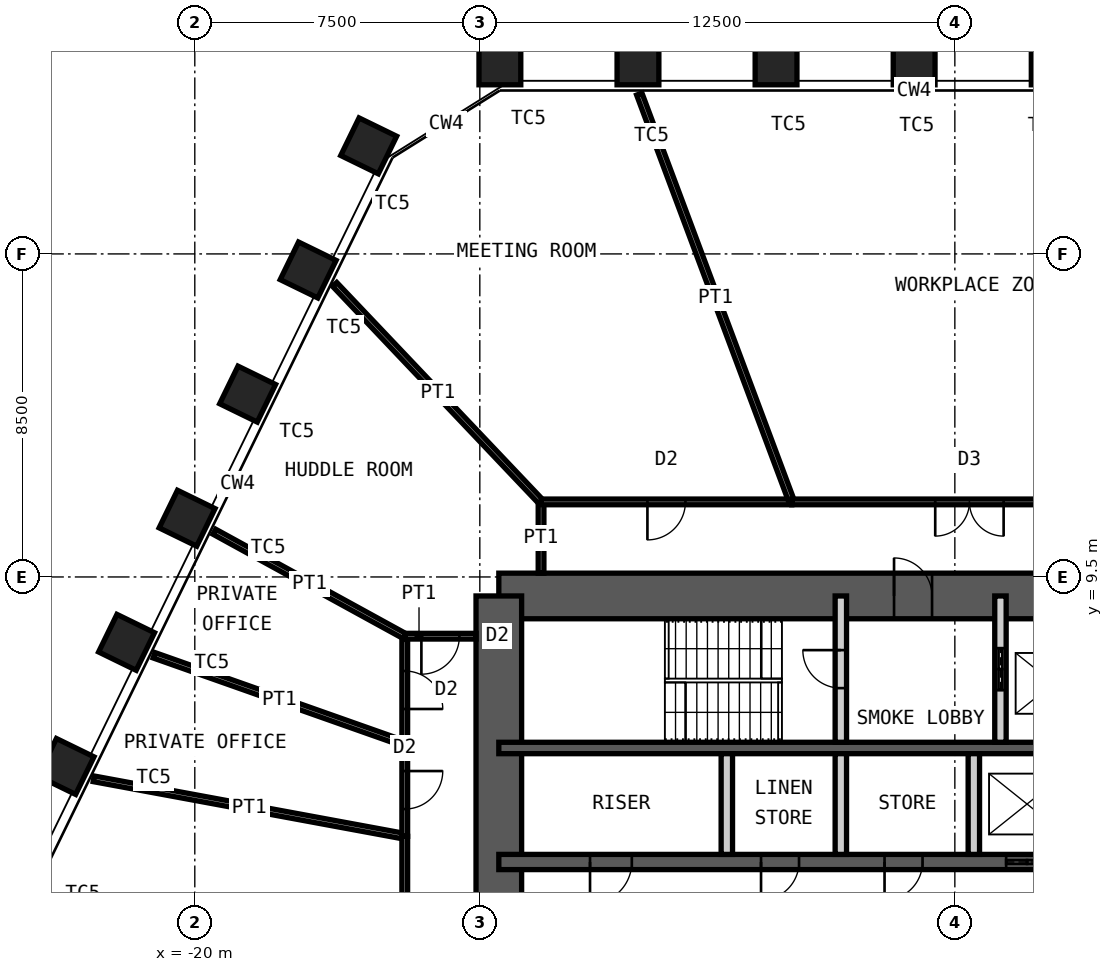
"""IFC4 building model, lengths in metres.
Left out: names, types, materials, properties, quantities, classifications, styles, units other than length and angle.
Written with IfcOpenShell. Run it as: python <this file> out.ifc"""

import sys

from ifc_helpers import new_model, si_unit, direction, frame, frame_2d, origin, origin_2d, place, context, subcontext, project, spatial, rectangle, hollow_rectangle, extrude, element, fill, save


model = new_model("IFC4")
c1 = context("Model", 3, precision=1e-05, world=origin(), true_north=direction((0.0, 1.0)))
c2 = subcontext(c1, "Body", "Model", "MODEL_VIEW")
j1 = project(units=[si_unit("LENGTHUNIT", "METRE"), si_unit("PLANEANGLEUNIT", "RADIAN")], contexts=[c1])
p1 = place(None, origin())
s1 = spatial("IfcSite", under=j1, at=p1, CompositionType="ELEMENT")
p2 = place(p1, origin())
s2 = spatial("IfcBuilding", under=s1, at=p2, CompositionType="ELEMENT")
p3 = place(p2, frame((0.0, 0.0, 188.8)))
s3 = spatial("IfcBuildingStorey", under=s2, at=p3, CompositionType="ELEMENT", Elevation=188.8)
for number, where, z_axis, x_axis in (
    (1, (-11.972, 23.0, 0.0), (0.0, 0.0, 1.0), (-1.0, 0.0, 0.0)),
    (2, (-8.338, 23.0, 0.0), (0.0, 0.0, 1.0), (-1.0, 0.0, 0.0)),
    (3, (-4.705, 23.0, 0.0), (0.0, 0.0, 1.0), (-1.0, 0.0, 0.0)),
    (4, (-1.071, 23.0, 0.0), (0.0, 0.0, 1.0), (-1.0, 0.0, 0.0)),
    (5, (2.562, 23.0, 0.0), (0.0, 0.0, 1.0), (-1.0, 0.0, 0.0)),
    (6, (-23.388, 4.514, 0.0), (0.0, 0.0, 1.0), (-0.438, -0.899, 0.0)),
    (7, (-21.795, 7.78, 0.0), (0.0, 0.0, 1.0), (-0.438, -0.899, 0.0)),
    (8, (-20.203, 11.045, 0.0), (0.0, 0.0, 1.0), (-0.438, -0.899, 0.0)),
    (9, (-18.61, 14.311, 0.0), (0.0, 0.0, 1.0), (-0.438, -0.899, 0.0)),
    (10, (-17.017, 17.577, 0.0), (0.0, 0.0, 1.0), (-0.438, -0.899, 0.0)),
    (11, (-15.424, 20.843, 0.0), (0.0, 0.0, 1.0), (-0.438, -0.899, 0.0)),
):
    element("IfcColumn", number, at=place(p3, frame(where, z_axis=z_axis, x_axis=x_axis)), inside=s3, PredefinedType="COLUMN", context=c2, shape_type="SweptSolid", body=[
        extrude(hollow_rectangle(XDim=1.1, YDim=1.1, WallThickness=0.07, at=origin_2d()), origin(), (0.0, 0.0, 1.0), 4.2),
    ])
p4 = place(p3, frame((-12.0, 9.0, 0.0), z_axis=(0.0, 0.0, 1.0), x_axis=(1.0, 0.0, 0.0)))
e12 = element("IfcWall", 12, at=p4, inside=s3, PredefinedType="SHEAR", context=c2, shape_type="SweptSolid", body=[
    extrude(rectangle(XDim=24.0, YDim=1.2, at=frame_2d((12.0, 0.0))), origin(), (0.0, 0.0, 1.0), 4.2),
])
p5 = place(p4, frame((10.4, 0.0, 0.0)))
e13 = element("IfcOpeningElement", 13, at=p5, cuts=e12, PredefinedType="OPENING", context=c2, shape_type="SweptSolid", body=[
    extrude(rectangle(XDim=1.0, YDim=2.1, at=frame_2d((0.5, 1.05))), frame((0.0, 0.61, 0.0), z_axis=(0.0, -1.0, 0.0), x_axis=(1.0, 0.0, 0.0)), (0.0, 0.0, 1.0), 1.22),
])
p6 = place(p4, frame((17.6, 0.0, 0.0)))
e14 = element("IfcOpeningElement", 14, at=p6, cuts=e12, PredefinedType="OPENING", context=c2, shape_type="SweptSolid", body=[
    extrude(rectangle(XDim=0.9, YDim=2.1, at=frame_2d((0.45, 1.05))), frame((0.0, 0.61, 0.0), z_axis=(0.0, -1.0, 0.0), x_axis=(1.0, 0.0, 0.0)), (0.0, 0.0, 1.0), 1.22),
])
p7 = place(p4, frame((21.9, 0.0, 0.0)))
e15 = element("IfcOpeningElement", 15, at=p7, cuts=e12, PredefinedType="OPENING", context=c2, shape_type="SweptSolid", body=[
    extrude(rectangle(XDim=0.9, YDim=2.1, at=frame_2d((0.45, 1.05))), frame((0.0, 0.61, 0.0), z_axis=(0.0, -1.0, 0.0), x_axis=(1.0, 0.0, 0.0)), (0.0, 0.0, 1.0), 1.22),
])
p8 = place(p3, frame((-12.0, -9.0, 0.0), z_axis=(0.0, 0.0, 1.0), x_axis=(0.0, 1.0, 0.0)))
e16 = element("IfcWall", 16, at=p8, inside=s3, PredefinedType="SHEAR", context=c2, shape_type="SweptSolid", body=[
    extrude(rectangle(XDim=18.0, YDim=1.2, at=frame_2d((9.0, 0.0))), origin(), (0.0, 0.0, 1.0), 4.2),
])
p9 = place(p8, frame((8.1, 0.0, 0.0)))
e17 = element("IfcOpeningElement", 17, at=p9, cuts=e16, PredefinedType="OPENING", context=c2, shape_type="SweptSolid", body=[
    extrude(rectangle(XDim=1.8, YDim=2.1, at=frame_2d((0.9, 1.05))), frame((0.0, 0.61, 0.0), z_axis=(0.0, -1.0, 0.0), x_axis=(1.0, 0.0, 0.0)), (0.0, 0.0, 1.0), 1.22),
])
p10 = place(p3, frame((-12.0, 5.0, 0.0), z_axis=(0.0, 0.0, 1.0), x_axis=(1.0, 0.0, 0.0)))
e18 = element("IfcWall", 18, at=p10, inside=s3, PredefinedType="SHEAR", context=c2, shape_type="SweptSolid", body=[
    extrude(rectangle(XDim=24.0, YDim=0.3, at=frame_2d((12.0, 0.0))), origin(), (0.0, 0.0, 1.0), 4.2),
])
p11 = place(p3, frame((-12.0, 2.0, 0.0), z_axis=(0.0, 0.0, 1.0), x_axis=(1.0, 0.0, 0.0)))
e19 = element("IfcWall", 19, at=p11, inside=s3, PredefinedType="SHEAR", context=c2, shape_type="SweptSolid", body=[
    extrude(rectangle(XDim=24.0, YDim=0.4, at=frame_2d((12.0, 0.0))), origin(), (0.0, 0.0, 1.0), 4.2),
])
p12 = place(p11, frame((2.4, 0.0, 0.0)))
e20 = element("IfcOpeningElement", 20, at=p12, cuts=e19, PredefinedType="OPENING", context=c2, shape_type="SweptSolid", body=[
    extrude(rectangle(XDim=1.1, YDim=2.1, at=frame_2d((0.55, 1.05))), frame((0.0, 0.21, 0.0), z_axis=(0.0, -1.0, 0.0), x_axis=(1.0, 0.0, 0.0)), (0.0, 0.0, 1.0), 0.42),
])
p13 = place(p11, frame((22.0, 0.0, 0.0)))
e21 = element("IfcOpeningElement", 21, at=p13, cuts=e19, PredefinedType="OPENING", context=c2, shape_type="SweptSolid", body=[
    extrude(rectangle(XDim=1.1, YDim=2.1, at=frame_2d((0.55, 1.05))), frame((0.0, 0.21, 0.0), z_axis=(0.0, -1.0, 0.0), x_axis=(1.0, 0.0, 0.0)), (0.0, 0.0, 1.0), 0.42),
])
p14 = place(p11, frame((10.15, 0.0, 0.0)))
e22 = element("IfcOpeningElement", 22, at=p14, cuts=e19, PredefinedType="OPENING", context=c2, shape_type="SweptSolid", body=[
    extrude(rectangle(XDim=1.0, YDim=2.1, at=frame_2d((0.5, 1.05))), frame((0.0, 0.21, 0.0), z_axis=(0.0, -1.0, 0.0), x_axis=(1.0, 0.0, 0.0)), (0.0, 0.0, 1.0), 0.42),
])
p15 = place(p11, frame((6.9, 0.0, 0.0)))
e23 = element("IfcOpeningElement", 23, at=p15, cuts=e19, PredefinedType="OPENING", context=c2, shape_type="SweptSolid", body=[
    extrude(rectangle(XDim=1.0, YDim=2.1, at=frame_2d((0.5, 1.05))), frame((0.0, 0.21, 0.0), z_axis=(0.0, -1.0, 0.0), x_axis=(1.0, 0.0, 0.0)), (0.0, 0.0, 1.0), 0.42),
])
p16 = place(p11, frame((13.35, 0.0, 0.0)))
e24 = element("IfcOpeningElement", 24, at=p16, cuts=e19, PredefinedType="OPENING", context=c2, shape_type="SweptSolid", body=[
    extrude(rectangle(XDim=1.1, YDim=2.4, at=frame_2d((0.55, 1.2))), frame((0.0, 0.21, 0.0), z_axis=(0.0, -1.0, 0.0), x_axis=(1.0, 0.0, 0.0)), (0.0, 0.0, 1.0), 0.42),
])
p17 = place(p11, frame((16.15, 0.0, 0.0)))
e25 = element("IfcOpeningElement", 25, at=p17, cuts=e19, PredefinedType="OPENING", context=c2, shape_type="SweptSolid", body=[
    extrude(rectangle(XDim=1.1, YDim=2.4, at=frame_2d((0.55, 1.2))), frame((0.0, 0.21, 0.0), z_axis=(0.0, -1.0, 0.0), x_axis=(1.0, 0.0, 0.0)), (0.0, 0.0, 1.0), 0.42),
])
p18 = place(p11, frame((18.95, 0.0, 0.0)))
e26 = element("IfcOpeningElement", 26, at=p18, cuts=e19, PredefinedType="OPENING", context=c2, shape_type="SweptSolid", body=[
    extrude(rectangle(XDim=1.1, YDim=2.4, at=frame_2d((0.55, 1.2))), frame((0.0, 0.21, 0.0), z_axis=(0.0, -1.0, 0.0), x_axis=(1.0, 0.0, 0.0)), (0.0, 0.0, 1.0), 0.42),
])
p19 = place(p3, frame((-3.0, 5.15, 0.0), z_axis=(0.0, 0.0, 1.0), x_axis=(0.0, 1.0, 0.0)))
e27 = element("IfcWall", 27, at=p19, inside=s3, PredefinedType="PARTITIONING", context=c2, shape_type="SweptSolid", body=[
    extrude(rectangle(XDim=3.85, YDim=0.3, at=frame_2d((1.925, 0.0))), origin(), (0.0, 0.0, 1.0), 3.98),
])
p20 = place(p19, frame((1.425, 0.0, 0.0)))
e28 = element("IfcOpeningElement", 28, at=p20, cuts=e27, PredefinedType="OPENING", context=c2, shape_type="SweptSolid", body=[
    extrude(rectangle(XDim=1.0, YDim=2.1, at=frame_2d((0.5, 1.05))), frame((0.0, 0.16, 0.0), z_axis=(0.0, -1.0, 0.0), x_axis=(1.0, 0.0, 0.0)), (0.0, 0.0, 1.0), 0.32),
])
p21 = place(p3, frame((1.2, 5.15, 0.0), z_axis=(0.0, 0.0, 1.0), x_axis=(0.0, 1.0, 0.0)))
e29 = element("IfcWall", 29, at=p21, inside=s3, PredefinedType="PARTITIONING", context=c2, shape_type="SweptSolid", body=[
    extrude(rectangle(XDim=3.85, YDim=0.3, at=frame_2d((1.925, 0.0))), origin(), (0.0, 0.0, 1.0), 3.98),
])
p22 = place(p21, frame((1.375, 0.0, 0.0)))
e30 = element("IfcOpeningElement", 30, at=p22, cuts=e29, PredefinedType="OPENING", context=c2, shape_type="SweptSolid", body=[
    extrude(rectangle(XDim=1.1, YDim=2.4, at=frame_2d((0.55, 1.2))), frame((0.0, 0.16, 0.0), z_axis=(0.0, -1.0, 0.0), x_axis=(1.0, 0.0, 0.0)), (0.0, 0.0, 1.0), 0.32),
])
for number, where, z_axis, x_axis in (
    (31, (-6.0, 2.2, 0.0), (0.0, 0.0, 1.0), (0.0, 1.0, 0.0)),
    (32, (-3.0, 2.2, 0.0), (0.0, 0.0, 1.0), (0.0, 1.0, 0.0)),
    (33, (0.5, 2.2, 0.0), (0.0, 0.0, 1.0), (0.0, 1.0, 0.0)),
):
    element("IfcWall", number, at=place(p3, frame(where, z_axis=z_axis, x_axis=x_axis)), inside=s3, PredefinedType="PARTITIONING", context=c2, shape_type="SweptSolid", body=[
        extrude(rectangle(XDim=2.65, YDim=0.3, at=frame_2d((1.325, 0.0))), origin(), (0.0, 0.0, 1.0), 3.98),
    ])
p23 = place(p3, frame((-22.661, 4.189, 0.0), z_axis=(0.0, 0.0, 1.0), x_axis=(0.983345347199, -0.181746879316, 0.0)))
e34 = element("IfcWall", 34, at=p23, inside=s3, PredefinedType="PARTITIONING", context=c2, shape_type="SweptSolid", body=[
    extrude(rectangle(XDim=8.324, YDim=0.15, at=frame_2d((4.162, 0.0))), origin(), (0.0, 0.0, 1.0), 3.43),
])
p24 = place(p3, frame((-14.475, 2.676, 0.0), z_axis=(0.0, 0.0, 1.0), x_axis=(0.0, 1.0, 0.0)))
e35 = element("IfcWall", 35, at=p24, inside=s3, PredefinedType="PARTITIONING", context=c2, shape_type="SweptSolid", body=[
    extrude(rectangle(XDim=2.435, YDim=0.15, at=frame_2d((1.217, 0.0))), origin(), (0.0, 0.0, 1.0), 4.03),
])
p25 = place(p24, frame((0.717, 0.0, 0.0)))
e36 = element("IfcOpeningElement", 36, at=p25, cuts=e35, PredefinedType="OPENING", context=c2, shape_type="SweptSolid", body=[
    extrude(rectangle(XDim=1.0, YDim=2.4, at=frame_2d((0.5, 1.2))), frame((0.0, 0.085, 0.0), z_axis=(0.0, -1.0, 0.0), x_axis=(1.0, 0.0, 0.0)), (0.0, 0.0, 1.0), 0.17),
])
p26 = place(p3, frame((-21.072, 7.439, 0.0), z_axis=(0.0, 0.0, 1.0), x_axis=(0.94295553867, -0.332918686907, 0.0)))
e37 = element("IfcWall", 37, at=p26, inside=s3, PredefinedType="PARTITIONING", context=c2, shape_type="SweptSolid", body=[
    extrude(rectangle(XDim=6.996, YDim=0.15, at=frame_2d((3.498, 0.0))), origin(), (0.0, 0.0, 1.0), 3.43),
])
p27 = place(p3, frame((-14.475, 5.11, 0.0), z_axis=(0.0, 0.0, 1.0), x_axis=(0.0, 1.0, 0.0)))
e38 = element("IfcWall", 38, at=p27, inside=s3, PredefinedType="PARTITIONING", context=c2, shape_type="SweptSolid", body=[
    extrude(rectangle(XDim=2.831, YDim=0.15, at=frame_2d((1.416, 0.0))), origin(), (0.0, 0.0, 1.0), 4.03),
])
p28 = place(p27, frame((0.916, 0.0, 0.0)))
e39 = element("IfcOpeningElement", 39, at=p28, cuts=e38, PredefinedType="OPENING", context=c2, shape_type="SweptSolid", body=[
    extrude(rectangle(XDim=1.0, YDim=2.4, at=frame_2d((0.5, 1.2))), frame((0.0, 0.085, 0.0), z_axis=(0.0, -1.0, 0.0), x_axis=(1.0, 0.0, 0.0)), (0.0, 0.0, 1.0), 0.17),
])
p29 = place(p3, frame((-19.486, 10.69, 0.0), z_axis=(0.0, 0.0, 1.0), x_axis=(0.876724089264, -0.480993629172, 0.0)))
e40 = element("IfcWall", 40, at=p29, inside=s3, PredefinedType="PARTITIONING", context=c2, shape_type="SweptSolid", body=[
    extrude(rectangle(XDim=5.715, YDim=0.15, at=frame_2d((2.858, 0.0))), origin(), (0.0, 0.0, 1.0), 3.43),
])
p30 = place(p3, frame((-14.475, 7.941, 0.0), z_axis=(0.0, 0.0, 1.0), x_axis=(1.0, 0.0, 0.0)))
e41 = element("IfcWall", 41, at=p30, inside=s3, PredefinedType="PARTITIONING", context=c2, shape_type="SweptSolid", body=[
    extrude(rectangle(XDim=1.875, YDim=0.15, at=frame_2d((0.938, 0.0))), origin(), (0.0, 0.0, 1.0), 4.03),
])
p31 = place(p30, frame((0.438, 0.0, 0.0)))
e42 = element("IfcOpeningElement", 42, at=p31, cuts=e41, PredefinedType="OPENING", context=c2, shape_type="SweptSolid", body=[
    extrude(rectangle(XDim=1.0, YDim=2.4, at=frame_2d((0.5, 1.2))), frame((0.0, 0.085, 0.0), z_axis=(0.0, -1.0, 0.0), x_axis=(1.0, 0.0, 0.0)), (0.0, 0.0, 1.0), 0.17),
])
p32 = place(p3, frame((-10.889, 9.6, 0.0), z_axis=(0.0, 0.0, 1.0), x_axis=(0.0, 1.0, 0.0)))
e43 = element("IfcWall", 43, at=p32, inside=s3, PredefinedType="PARTITIONING", context=c2, shape_type="SweptSolid", body=[
    extrude(rectangle(XDim=1.875, YDim=0.15, at=frame_2d((0.938, 0.0))), origin(), (0.0, 0.0, 1.0), 4.03),
])
p33 = place(p3, frame((-16.319, 17.198, 0.0), z_axis=(0.0, 0.0, 1.0), x_axis=(0.688326413955, -0.725401094466, 0.0)))
e44 = element("IfcWall", 44, at=p33, inside=s3, PredefinedType="PARTITIONING", context=c2, shape_type="SweptSolid", body=[
    extrude(rectangle(XDim=7.889, YDim=0.15, at=frame_2d((3.944, 0.0))), origin(), (0.0, 0.0, 1.0), 4.03),
])
p34 = place(p3, frame((-10.889, 11.475, 0.0), z_axis=(0.0, 0.0, 1.0), x_axis=(1.0, 0.0, 0.0)))
e45 = element("IfcWall", 45, at=p34, inside=s3, PredefinedType="PARTITIONING", context=c2, shape_type="SweptSolid", body=[
    extrude(rectangle(XDim=6.598, YDim=0.15, at=frame_2d((3.299, 0.0))), origin(), (0.0, 0.0, 1.0), 4.03),
])
p35 = place(p34, frame((2.799, 0.0, 0.0)))
e46 = element("IfcOpeningElement", 46, at=p35, cuts=e45, PredefinedType="OPENING", context=c2, shape_type="SweptSolid", body=[
    extrude(rectangle(XDim=1.0, YDim=2.4, at=frame_2d((0.5, 1.2))), frame((0.0, 0.085, 0.0), z_axis=(0.0, -1.0, 0.0), x_axis=(1.0, 0.0, 0.0)), (0.0, 0.0, 1.0), 0.17),
])
p36 = place(p3, frame((-8.303, 22.206, 0.0), z_axis=(0.0, 0.0, 1.0), x_axis=(0.350242883069, -0.936658914899, 0.0)))
e47 = element("IfcWall", 47, at=p36, inside=s3, PredefinedType="PARTITIONING", context=c2, shape_type="SweptSolid", body=[
    extrude(rectangle(XDim=11.457, YDim=0.15, at=frame_2d((5.729, 0.0))), origin(), (0.0, 0.0, 1.0), 3.43),
])
p37 = place(p3, frame((-4.291, 11.475, 0.0), z_axis=(0.0, 0.0, 1.0), x_axis=(1.0, 0.0, 0.0)))
e48 = element("IfcWall", 48, at=p37, inside=s3, PredefinedType="PARTITIONING", context=c2, shape_type="SweptSolid", body=[
    extrude(rectangle(XDim=9.349, YDim=0.15, at=frame_2d((4.674, 0.0))), origin(), (0.0, 0.0, 1.0), 4.03),
])
p38 = place(p37, frame((3.774, 0.0, 0.0)))
e49 = element("IfcOpeningElement", 49, at=p38, cuts=e48, PredefinedType="OPENING", context=c2, shape_type="SweptSolid", body=[
    extrude(rectangle(XDim=1.8, YDim=2.4, at=frame_2d((0.9, 1.2))), frame((0.0, 0.085, 0.0), z_axis=(0.0, -1.0, 0.0), x_axis=(1.0, 0.0, 0.0)), (0.0, 0.0, 1.0), 0.17),
])
p39 = place(p3, frame((-14.475, -9.311, 0.0), z_axis=(0.0, 0.0, 1.0), x_axis=(0.0, 1.0, 0.0)))
e50 = element("IfcWall", 50, at=p39, inside=s3, PredefinedType="PARTITIONING", context=c2, shape_type="SweptSolid", body=[
    extrude(rectangle(XDim=11.987, YDim=0.15, at=frame_2d((5.993, 0.0))), origin(), (0.0, 0.0, 1.0), 4.03),
])
p40 = place(p39, frame((5.093, 0.0, 0.0)))
e51 = element("IfcOpeningElement", 51, at=p40, cuts=e50, PredefinedType="OPENING", context=c2, shape_type="SweptSolid", body=[
    extrude(rectangle(XDim=1.8, YDim=2.4, at=frame_2d((0.9, 1.2))), frame((0.0, 0.085, 0.0), z_axis=(0.0, -1.0, 0.0), x_axis=(1.0, 0.0, 0.0)), (0.0, 0.0, 1.0), 0.17),
])
p41 = place(p5, origin())
e52 = element("IfcDoor", 52, at=p41, inside=s3, OperationType="SINGLE_SWING_RIGHT", PredefinedType="DOOR", context=c2, shape_type="SweptSolid", body=[
    extrude(rectangle(XDim=1.0, YDim=2.1, at=frame_2d((0.5, 1.05))), frame((0.0, 0.025, 0.0), z_axis=(0.0, -1.0, 0.0), x_axis=(1.0, 0.0, 0.0)), (0.0, 0.0, 1.0), 0.05),
])
fill(e13, e52)
p42 = place(p20, origin())
e53 = element("IfcDoor", 53, at=p42, inside=s3, OperationType="SINGLE_SWING_LEFT", PredefinedType="DOOR", context=c2, shape_type="SweptSolid", body=[
    extrude(rectangle(XDim=1.0, YDim=2.1, at=frame_2d((0.5, 1.05))), frame((0.0, 0.025, 0.0), z_axis=(0.0, -1.0, 0.0), x_axis=(1.0, 0.0, 0.0)), (0.0, 0.0, 1.0), 0.05),
])
fill(e28, e53)
p43 = place(p12, origin())
e54 = element("IfcDoor", 54, at=p43, inside=s3, OperationType="SINGLE_SWING_LEFT", PredefinedType="DOOR", context=c2, shape_type="SweptSolid", body=[
    extrude(rectangle(XDim=1.1, YDim=2.1, at=frame_2d((0.55, 1.05))), frame((0.0, 0.025, 0.0), z_axis=(0.0, -1.0, 0.0), x_axis=(1.0, 0.0, 0.0)), (0.0, 0.0, 1.0), 0.05),
])
fill(e20, e54)
p44 = place(p14, origin())
e55 = element("IfcDoor", 55, at=p44, inside=s3, OperationType="SINGLE_SWING_LEFT", PredefinedType="DOOR", context=c2, shape_type="SweptSolid", body=[
    extrude(rectangle(XDim=1.0, YDim=2.1, at=frame_2d((0.5, 1.05))), frame((0.0, 0.025, 0.0), z_axis=(0.0, -1.0, 0.0), x_axis=(1.0, 0.0, 0.0)), (0.0, 0.0, 1.0), 0.05),
])
fill(e22, e55)
p45 = place(p22, origin())
e56 = element("IfcDoor", 56, at=p45, inside=s3, OperationType="DOUBLE_DOOR_SLIDING", PredefinedType="DOOR", context=c2, shape_type="SweptSolid", body=[
    extrude(rectangle(XDim=1.1, YDim=2.4, at=frame_2d((0.55, 1.2))), frame((0.0, 0.025, 0.0), z_axis=(0.0, -1.0, 0.0), x_axis=(1.0, 0.0, 0.0)), (0.0, 0.0, 1.0), 0.05),
])
fill(e30, e56)
p46 = place(p15, origin())
e57 = element("IfcDoor", 57, at=p46, inside=s3, OperationType="SINGLE_SWING_LEFT", PredefinedType="DOOR", context=c2, shape_type="SweptSolid", body=[
    extrude(rectangle(XDim=1.0, YDim=2.1, at=frame_2d((0.5, 1.05))), frame((0.0, 0.025, 0.0), z_axis=(0.0, -1.0, 0.0), x_axis=(1.0, 0.0, 0.0)), (0.0, 0.0, 1.0), 0.05),
])
fill(e23, e57)
p47 = place(p16, origin())
e58 = element("IfcDoor", 58, at=p47, inside=s3, OperationType="DOUBLE_DOOR_SLIDING", PredefinedType="DOOR", context=c2, shape_type="SweptSolid", body=[
    extrude(rectangle(XDim=1.1, YDim=2.4, at=frame_2d((0.55, 1.2))), frame((0.0, 0.025, 0.0), z_axis=(0.0, -1.0, 0.0), x_axis=(1.0, 0.0, 0.0)), (0.0, 0.0, 1.0), 0.05),
])
fill(e24, e58)
p48 = place(p25, origin())
e59 = element("IfcDoor", 59, at=p48, inside=s3, OperationType="SINGLE_SWING_RIGHT", PredefinedType="DOOR", context=c2, shape_type="SweptSolid", body=[
    extrude(rectangle(XDim=1.0, YDim=2.4, at=frame_2d((0.5, 1.2))), frame((0.0, 0.025, 0.0), z_axis=(0.0, -1.0, 0.0), x_axis=(1.0, 0.0, 0.0)), (0.0, 0.0, 1.0), 0.05),
])
fill(e36, e59)
p49 = place(p28, origin())
e60 = element("IfcDoor", 60, at=p49, inside=s3, OperationType="SINGLE_SWING_LEFT", PredefinedType="DOOR", context=c2, shape_type="SweptSolid", body=[
    extrude(rectangle(XDim=1.0, YDim=2.4, at=frame_2d((0.5, 1.2))), frame((0.0, 0.025, 0.0), z_axis=(0.0, -1.0, 0.0), x_axis=(1.0, 0.0, 0.0)), (0.0, 0.0, 1.0), 0.05),
])
fill(e39, e60)
p50 = place(p31, origin())
e61 = element("IfcDoor", 61, at=p50, inside=s3, OperationType="SINGLE_SWING_LEFT", PredefinedType="DOOR", context=c2, shape_type="SweptSolid", body=[
    extrude(rectangle(XDim=1.0, YDim=2.4, at=frame_2d((0.5, 1.2))), frame((0.0, 0.025, 0.0), z_axis=(0.0, -1.0, 0.0), x_axis=(1.0, 0.0, 0.0)), (0.0, 0.0, 1.0), 0.05),
])
fill(e42, e61)
p51 = place(p35, origin())
e62 = element("IfcDoor", 62, at=p51, inside=s3, OperationType="SINGLE_SWING_LEFT", PredefinedType="DOOR", context=c2, shape_type="SweptSolid", body=[
    extrude(rectangle(XDim=1.0, YDim=2.4, at=frame_2d((0.5, 1.2))), frame((0.0, 0.025, 0.0), z_axis=(0.0, -1.0, 0.0), x_axis=(1.0, 0.0, 0.0)), (0.0, 0.0, 1.0), 0.05),
])
fill(e46, e62)
p52 = place(p38, origin())
e63 = element("IfcDoor", 63, at=p52, inside=s3, OperationType="DOUBLE_DOOR_DOUBLE_SWING", PredefinedType="DOOR", context=c2, shape_type="SweptSolid", body=[
    extrude(rectangle(XDim=1.8, YDim=2.4, at=frame_2d((0.9, 1.2))), frame((0.0, 0.025, 0.0), z_axis=(0.0, -1.0, 0.0), x_axis=(1.0, 0.0, 0.0)), (0.0, 0.0, 1.0), 0.05),
])
fill(e49, e63)
save(model, sys.argv[1])
